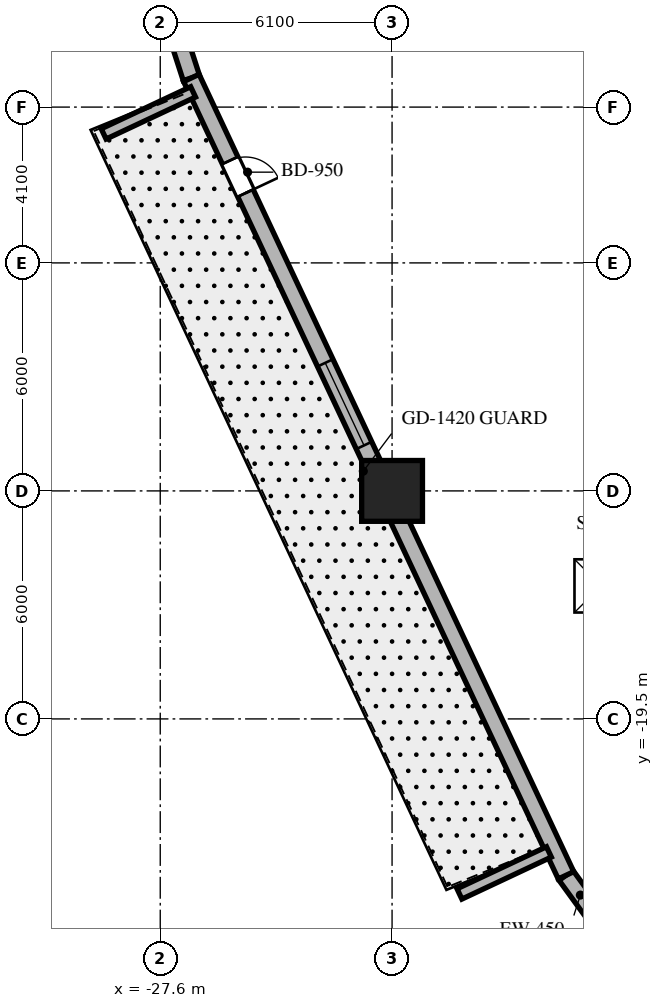
"""IFC4 building model, lengths in metres.
Left out: names, types, materials, properties, quantities, classifications, styles, units other than length and angle.
Written with IfcOpenShell. Run it as: python <this file> out.ifc"""

import sys

from ifc_helpers import new_model, si_unit, direction, frame, frame_2d, origin, origin_2d, place, context, subcontext, project, spatial, rectangle, extrude, element, fill, save


model = new_model("IFC4")
c1 = context("Model", 3, precision=1e-05, world=origin(), true_north=direction((0.0, 1.0)))
c2 = subcontext(c1, "Body", "Model", "MODEL_VIEW")
j1 = project(units=[si_unit("LENGTHUNIT", "METRE"), si_unit("PLANEANGLEUNIT", "RADIAN")], contexts=[c1])
p1 = place(None, origin())
s1 = spatial("IfcSite", under=j1, at=p1, CompositionType="ELEMENT")
p2 = place(p1, origin())
s2 = spatial("IfcBuilding", under=s1, at=p2, CompositionType="ELEMENT")
p3 = place(p2, frame((0.0, 0.0, 28.2)))
s3 = spatial("IfcBuildingStorey", under=s2, at=p3, CompositionType="ELEMENT", Elevation=28.2)
p4 = place(p3, frame((-21.5, -13.5, 0.0), z_axis=(0.0, 0.0, 1.0), x_axis=(1.0, 0.0, 0.0)))
e1 = element("IfcColumn", 1, at=p4, inside=s3, PredefinedType="COLUMN", context=c2, shape_type="SweptSolid", body=[
    extrude(rectangle(XDim=1.6, YDim=1.6, at=origin_2d()), origin(), (0.0, 0.0, 1.0), 6.0),
])
p5 = place(p3, frame((-16.924, -23.616, 0.0), z_axis=(0.0, 0.0, 1.0), x_axis=(0.587471507827, -0.809244850148, 0.0)))
e2 = element("IfcWall", 2, at=p5, inside=s3, PredefinedType="SOLIDWALL", context=c2, shape_type="SweptSolid", body=[
    extrude(rectangle(XDim=1.286, YDim=0.45, at=frame_2d((0.643, 0.0))), origin(), (0.0, 0.0, 1.0), 5.7),
])
p6 = place(p3, frame((-27.047, -1.811, 0.0), z_axis=(0.0, 0.0, 1.0), x_axis=(0.307993314005, -0.951388521335, 0.0)))
e3 = element("IfcWall", 3, at=p6, inside=s3, PredefinedType="SOLIDWALL", context=c2, shape_type="SweptSolid", body=[
    extrude(rectangle(XDim=0.864, YDim=0.45, at=frame_2d((0.432, 0.0))), origin(), (0.0, 0.0, 1.0), 5.7),
])
p7 = place(p3, frame((-26.781, -2.633, 0.0), z_axis=(0.0, 0.0, 1.0), x_axis=(0.425204576933, -0.905097269776, 0.0)))
e4 = element("IfcWall", 4, at=p7, inside=s3, PredefinedType="SOLIDWALL", context=c2, shape_type="SweptSolid", body=[
    extrude(rectangle(XDim=23.183, YDim=0.45, at=frame_2d((11.591, 0.0))), origin(), (0.0, 0.0, 1.0), 5.7),
])
p8 = place(p7, frame((2.398, 0.0, 0.0)))
e5 = element("IfcOpeningElement", 5, at=p8, cuts=e4, PredefinedType="OPENING", context=c2, shape_type="SweptSolid", body=[
    extrude(rectangle(XDim=0.95, YDim=2.15, at=frame_2d((0.475, 1.075))), frame((0.0, 0.235, 0.0), z_axis=(0.0, -1.0, 0.0), x_axis=(1.0, 0.0, 0.0)), (0.0, 0.0, 1.0), 0.47),
])
p9 = place(p7, frame((8.284, 0.0, 0.85)))
e6 = element("IfcOpeningElement", 6, at=p9, cuts=e4, PredefinedType="OPENING", context=c2, shape_type="SweptSolid", body=[
    extrude(rectangle(XDim=2.4, YDim=2.4, at=frame_2d((1.2, 1.2))), frame((0.0, 0.235, 0.0), z_axis=(0.0, -1.0, 0.0), x_axis=(1.0, 0.0, 0.0)), (0.0, 0.0, 1.0), 0.47),
])
for number, where, z_axis, x_axis in (
    (7, (-26.736, -3.0, 0.0), (0.0, 0.0, 1.0), (-0.905, -0.425, 0.0)),
    (8, (-17.373, -23.0, 0.0), (0.0, 0.0, 1.0), (-0.905, -0.425, 0.0)),
):
    element("IfcWall", number, at=place(p3, frame(where, z_axis=z_axis, x_axis=x_axis)), inside=s3, PredefinedType="PARAPET", context=c2, shape_type="SweptSolid", body=[
        extrude(rectangle(XDim=2.6, YDim=0.3, at=frame_2d((1.3, 0.0))), origin(), (0.0, 0.0, 1.0), 1.15),
    ])
p10 = place(p3, frame((0.0, 0.0, -0.32)))
p11 = place(p10, frame((-16.0, -16.0, 0.27)))
e9 = element("IfcWindow", 9, at=p11, inside=s3, PartitioningType="SINGLE_PANEL", PredefinedType="SKYLIGHT", context=c2, shape_type="SweptSolid", body=[
    extrude(rectangle(XDim=1.4, YDim=1.4, at=origin_2d()), origin(), (0.0, 0.0, 1.0), 0.05),
])
p12 = place(p8, origin())
e10 = element("IfcDoor", 10, at=p12, inside=s3, OperationType="SINGLE_SWING_RIGHT", PredefinedType="DOOR", context=c2, shape_type="SweptSolid", body=[
    extrude(rectangle(XDim=0.95, YDim=2.15, at=frame_2d((0.475, 1.075))), frame((0.0, 0.025, 0.0), z_axis=(0.0, -1.0, 0.0), x_axis=(1.0, 0.0, 0.0)), (0.0, 0.0, 1.0), 0.05),
])
fill(e5, e10)
p13 = place(p9, origin())
e11 = element("IfcWindow", 11, at=p13, inside=s3, PartitioningType="SINGLE_PANEL", PredefinedType="WINDOW", context=c2, shape_type="SweptSolid", body=[
    extrude(rectangle(XDim=2.4, YDim=2.4, at=frame_2d((1.2, 1.2))), frame((0.0, 0.03, 0.0), z_axis=(0.0, -1.0, 0.0), x_axis=(1.0, 0.0, 0.0)), (0.0, 0.0, 1.0), 0.06),
])
fill(e6, e11)
save(model, sys.argv[1])
